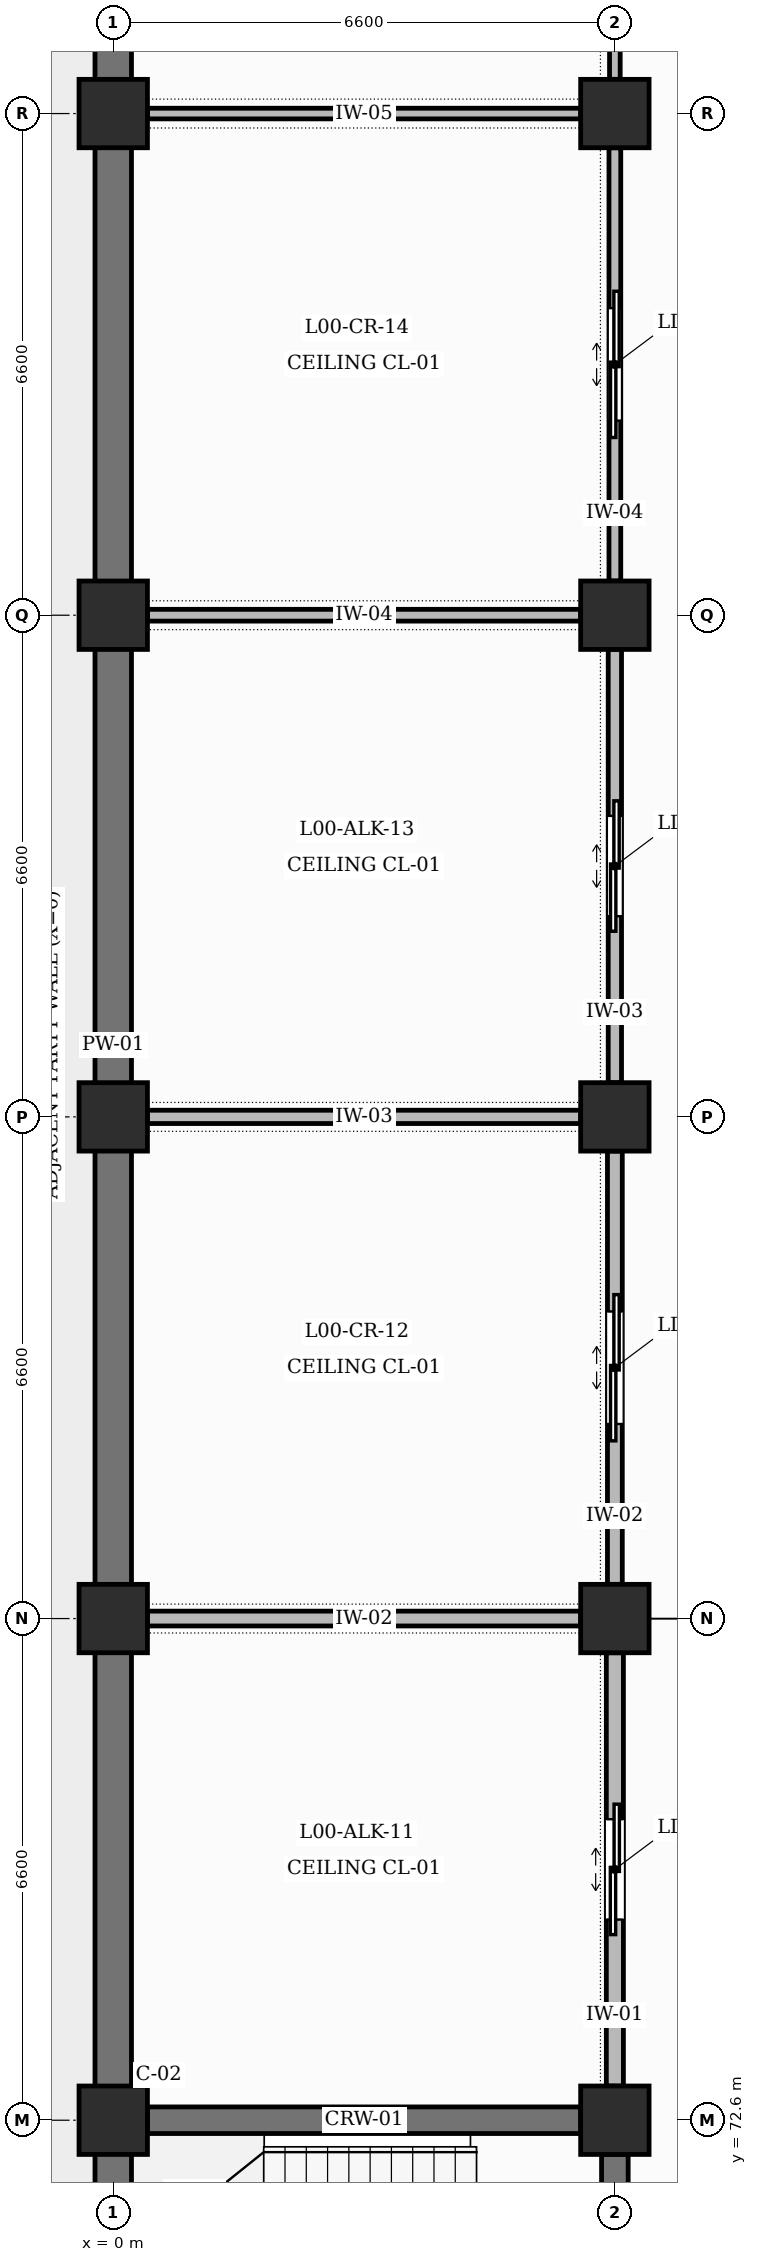
"""IFC4 building model, lengths in metres.
Left out: names, types, materials, properties, quantities, classifications, styles, units other than length and angle.
Written with IfcOpenShell. Run it as: python <this file> out.ifc"""

import sys

from ifc_helpers import new_model, si_unit, direction, frame, frame_2d, origin, origin_2d, place, context, subcontext, project, spatial, rectangle, extrude, element, fill, save


model = new_model("IFC4")
c1 = context("Model", 3, precision=1e-05, world=origin(), true_north=direction((0.0, 1.0)))
c2 = subcontext(c1, "Body", "Model", "MODEL_VIEW")
j1 = project(units=[si_unit("LENGTHUNIT", "METRE"), si_unit("PLANEANGLEUNIT", "RADIAN")], contexts=[c1])
p1 = place(None, origin())
s1 = spatial("IfcSite", under=j1, at=p1, CompositionType="ELEMENT")
p2 = place(p1, origin())
s2 = spatial("IfcBuilding", under=s1, at=p2, CompositionType="ELEMENT")
p3 = place(p2, origin())
s3 = spatial("IfcBuildingStorey", under=s2, at=p3, CompositionType="ELEMENT", Elevation=0.0)
for number, where, z_axis, x_axis in (
    (1, (0.0, 72.6, 0.0), (0.0, 0.0, 1.0), (1.0, 0.0, 0.0)),
    (2, (0.0, 79.2, 0.0), (0.0, 0.0, 1.0), (1.0, 0.0, 0.0)),
    (3, (0.0, 85.8, 0.0), (0.0, 0.0, 1.0), (1.0, 0.0, 0.0)),
    (4, (0.0, 92.4, 0.0), (0.0, 0.0, 1.0), (1.0, 0.0, 0.0)),
    (5, (0.0, 99.0, 0.0), (0.0, 0.0, 1.0), (1.0, 0.0, 0.0)),
    (6, (6.6, 72.6, 0.0), (0.0, 0.0, 1.0), (1.0, 0.0, 0.0)),
    (7, (6.6, 79.2, 0.0), (0.0, 0.0, 1.0), (1.0, 0.0, 0.0)),
    (8, (6.6, 85.8, 0.0), (0.0, 0.0, 1.0), (1.0, 0.0, 0.0)),
    (9, (6.6, 92.4, 0.0), (0.0, 0.0, 1.0), (1.0, 0.0, 0.0)),
    (10, (6.6, 99.0, 0.0), (0.0, 0.0, 1.0), (1.0, 0.0, 0.0)),
):
    element("IfcColumn", number, at=place(p3, frame(where, z_axis=z_axis, x_axis=x_axis)), inside=s3, PredefinedType="COLUMN", context=c2, shape_type="SweptSolid", body=[
        extrude(rectangle(XDim=0.9, YDim=0.9, at=origin_2d()), origin(), (0.0, 0.0, 1.0), 5.4),
    ])
for number, where, z_axis, x_axis in (
    (11, (0.0, 66.45, 0.0), (0.0, 0.0, 1.0), (0.0, 1.0, 0.0)),
    (12, (0.0, 73.05, 0.0), (0.0, 0.0, 1.0), (0.0, 1.0, 0.0)),
):
    element("IfcWall", number, at=place(p3, frame(where, z_axis=z_axis, x_axis=x_axis)), inside=s3, PredefinedType="SOLIDWALL", context=c2, shape_type="SweptSolid", body=[
        extrude(rectangle(XDim=5.7, YDim=0.48, at=frame_2d((2.85, 0.0))), origin(), (0.0, 0.0, 1.0), 4.45),
    ])
p4 = place(p3, frame((0.0, 79.65, 0.0), z_axis=(0.0, 0.0, 1.0), x_axis=(0.0, 1.0, 0.0)))
e13 = element("IfcWall", 13, at=p4, inside=s3, PredefinedType="SOLIDWALL", context=c2, shape_type="SweptSolid", body=[
    extrude(rectangle(XDim=5.7, YDim=0.48, at=frame_2d((2.85, 0.0))), origin(), (0.0, 0.0, 1.0), 4.45),
])
for number, where, z_axis, x_axis in (
    (14, (0.0, 86.25, 0.0), (0.0, 0.0, 1.0), (0.0, 1.0, 0.0)),
    (15, (0.0, 92.85, 0.0), (0.0, 0.0, 1.0), (0.0, 1.0, 0.0)),
    (16, (0.0, 99.45, 0.0), (0.0, 0.0, 1.0), (0.0, 1.0, 0.0)),
):
    element("IfcWall", number, at=place(p3, frame(where, z_axis=z_axis, x_axis=x_axis)), inside=s3, PredefinedType="SOLIDWALL", context=c2, shape_type="SweptSolid", body=[
        extrude(rectangle(XDim=5.7, YDim=0.48, at=frame_2d((2.85, 0.0))), origin(), (0.0, 0.0, 1.0), 4.45),
    ])
p5 = place(p3, frame((0.45, 72.6, 0.0), z_axis=(0.0, 0.0, 1.0), x_axis=(1.0, 0.0, 0.0)))
e17 = element("IfcWall", 17, at=p5, inside=s3, PredefinedType="SHEAR", context=c2, shape_type="SweptSolid", body=[
    extrude(rectangle(XDim=5.7, YDim=0.35, at=frame_2d((2.85, 0.0))), origin(), (0.0, 0.0, 1.0), 4.3),
])
p6 = place(p3, frame((6.6, 66.45, 0.0), z_axis=(0.0, 0.0, 1.0), x_axis=(0.0, 1.0, 0.0)))
e18 = element("IfcWall", 18, at=p6, inside=s3, PredefinedType="SHEAR", context=c2, shape_type="SweptSolid", body=[
    extrude(rectangle(XDim=5.7, YDim=0.35, at=frame_2d((2.85, 0.0))), origin(), (0.0, 0.0, 1.0), 4.3),
])
p7 = place(p6, frame((2.275, 0.0, 0.0)))
e19 = element("IfcOpeningElement", 19, at=p7, cuts=e18, PredefinedType="OPENING", context=c2, shape_type="SweptSolid", body=[
    extrude(rectangle(XDim=1.15, YDim=2.2, at=frame_2d((0.575, 1.1))), frame((0.0, 0.185, 0.0), z_axis=(0.0, -1.0, 0.0), x_axis=(1.0, 0.0, 0.0)), (0.0, 0.0, 1.0), 0.37),
])
p8 = place(p3, frame((6.6, 73.05, 0.0), z_axis=(0.0, 0.0, 1.0), x_axis=(0.0, 1.0, 0.0)))
e20 = element("IfcWall", 20, at=p8, inside=s3, PredefinedType="PARTITIONING", context=c2, shape_type="SweptSolid", body=[
    extrude(rectangle(XDim=5.7, YDim=0.225, at=frame_2d((2.85, 0.0))), origin(), (0.0, 0.0, 1.0), 4.3),
])
p9 = place(p8, frame((2.19, 0.0, 0.0)))
e21 = element("IfcOpeningElement", 21, at=p9, cuts=e20, PredefinedType="OPENING", context=c2, shape_type="SweptSolid", body=[
    extrude(rectangle(XDim=1.32, YDim=2.2, at=frame_2d((0.66, 1.1))), frame((0.0, 0.123, 0.0), z_axis=(0.0, -1.0, 0.0), x_axis=(1.0, 0.0, 0.0)), (0.0, 0.0, 1.0), 0.245),
])
p10 = place(p3, frame((0.45, 79.2, 0.0), z_axis=(0.0, 0.0, 1.0), x_axis=(1.0, 0.0, 0.0)))
e22 = element("IfcWall", 22, at=p10, inside=s3, PredefinedType="PARTITIONING", context=c2, shape_type="SweptSolid", body=[
    extrude(rectangle(XDim=5.7, YDim=0.195, at=frame_2d((2.85, 0.0))), origin(), (0.0, 0.0, 1.0), 4.2),
])
p11 = place(p3, frame((6.6, 79.65, 0.0), z_axis=(0.0, 0.0, 1.0), x_axis=(0.0, 1.0, 0.0)))
e23 = element("IfcWall", 23, at=p11, inside=s3, PredefinedType="PARTITIONING", context=c2, shape_type="SweptSolid", body=[
    extrude(rectangle(XDim=5.7, YDim=0.195, at=frame_2d((2.85, 0.0))), origin(), (0.0, 0.0, 1.0), 4.3),
])
p12 = place(p11, frame((2.11, 0.0, 0.0)))
e24 = element("IfcOpeningElement", 24, at=p12, cuts=e23, PredefinedType="OPENING", context=c2, shape_type="SweptSolid", body=[
    extrude(rectangle(XDim=1.48, YDim=2.25, at=frame_2d((0.74, 1.125))), frame((0.0, 0.107, 0.0), z_axis=(0.0, -1.0, 0.0), x_axis=(1.0, 0.0, 0.0)), (0.0, 0.0, 1.0), 0.215),
])
p13 = place(p3, frame((0.45, 85.8, 0.0), z_axis=(0.0, 0.0, 1.0), x_axis=(1.0, 0.0, 0.0)))
e25 = element("IfcWall", 25, at=p13, inside=s3, PredefinedType="PARTITIONING", context=c2, shape_type="SweptSolid", body=[
    extrude(rectangle(XDim=5.7, YDim=0.175, at=frame_2d((2.85, 0.0))), origin(), (0.0, 0.0, 1.0), 4.3),
])
p14 = place(p3, frame((6.6, 86.25, 0.0), z_axis=(0.0, 0.0, 1.0), x_axis=(0.0, 1.0, 0.0)))
e26 = element("IfcWall", 26, at=p14, inside=s3, PredefinedType="PARTITIONING", context=c2, shape_type="SweptSolid", body=[
    extrude(rectangle(XDim=5.7, YDim=0.175, at=frame_2d((2.85, 0.0))), origin(), (0.0, 0.0, 1.0), 4.3),
])
p15 = place(p14, frame((2.19, 0.0, 0.0)))
e27 = element("IfcOpeningElement", 27, at=p15, cuts=e26, PredefinedType="OPENING", context=c2, shape_type="SweptSolid", body=[
    extrude(rectangle(XDim=1.32, YDim=2.2, at=frame_2d((0.66, 1.1))), frame((0.0, 0.097, 0.0), z_axis=(0.0, -1.0, 0.0), x_axis=(1.0, 0.0, 0.0)), (0.0, 0.0, 1.0), 0.195),
])
p16 = place(p3, frame((0.45, 92.4, 0.0), z_axis=(0.0, 0.0, 1.0), x_axis=(1.0, 0.0, 0.0)))
e28 = element("IfcWall", 28, at=p16, inside=s3, PredefinedType="PARTITIONING", context=c2, shape_type="SweptSolid", body=[
    extrude(rectangle(XDim=5.7, YDim=0.155, at=frame_2d((2.85, 0.0))), origin(), (0.0, 0.0, 1.0), 4.2),
])
p17 = place(p3, frame((6.6, 92.85, 0.0), z_axis=(0.0, 0.0, 1.0), x_axis=(0.0, 1.0, 0.0)))
e29 = element("IfcWall", 29, at=p17, inside=s3, PredefinedType="PARTITIONING", context=c2, shape_type="SweptSolid", body=[
    extrude(rectangle(XDim=5.7, YDim=0.155, at=frame_2d((2.85, 0.0))), origin(), (0.0, 0.0, 1.0), 4.3),
])
p18 = place(p17, frame((2.11, 0.0, 0.0)))
e30 = element("IfcOpeningElement", 30, at=p18, cuts=e29, PredefinedType="OPENING", context=c2, shape_type="SweptSolid", body=[
    extrude(rectangle(XDim=1.48, YDim=2.25, at=frame_2d((0.74, 1.125))), frame((0.0, 0.087, 0.0), z_axis=(0.0, -1.0, 0.0), x_axis=(1.0, 0.0, 0.0)), (0.0, 0.0, 1.0), 0.175),
])
p19 = place(p3, frame((0.45, 99.0, 0.0), z_axis=(0.0, 0.0, 1.0), x_axis=(1.0, 0.0, 0.0)))
e31 = element("IfcWall", 31, at=p19, inside=s3, PredefinedType="PARTITIONING", context=c2, shape_type="SweptSolid", body=[
    extrude(rectangle(XDim=5.7, YDim=0.14, at=frame_2d((2.85, 0.0))), origin(), (0.0, 0.0, 1.0), 4.3),
])
p20 = place(p3, frame((6.6, 99.45, 0.0), z_axis=(0.0, 0.0, 1.0), x_axis=(0.0, 1.0, 0.0)))
e32 = element("IfcWall", 32, at=p20, inside=s3, PredefinedType="PARTITIONING", context=c2, shape_type="SweptSolid", body=[
    extrude(rectangle(XDim=5.7, YDim=0.14, at=frame_2d((2.85, 0.0))), origin(), (0.0, 0.0, 1.0), 4.3),
])
p21 = place(p20, frame((2.19, 0.0, 0.0)))
e33 = element("IfcOpeningElement", 33, at=p21, cuts=e32, PredefinedType="OPENING", context=c2, shape_type="SweptSolid", body=[
    extrude(rectangle(XDim=1.32, YDim=2.2, at=frame_2d((0.66, 1.1))), frame((0.0, 0.08, 0.0), z_axis=(0.0, -1.0, 0.0), x_axis=(1.0, 0.0, 0.0)), (0.0, 0.0, 1.0), 0.16),
])
p22 = place(p9, origin())
e34 = element("IfcDoor", 34, at=p22, inside=s3, OperationType="DOUBLE_DOOR_SLIDING", PredefinedType="USERDEFINED", context=c2, shape_type="SweptSolid", body=[
    extrude(rectangle(XDim=1.32, YDim=2.2, at=frame_2d((0.66, 1.1))), frame((0.0, 0.025, 0.0), z_axis=(0.0, -1.0, 0.0), x_axis=(1.0, 0.0, 0.0)), (0.0, 0.0, 1.0), 0.05),
])
fill(e21, e34)
p23 = place(p12, origin())
e35 = element("IfcDoor", 35, at=p23, inside=s3, OperationType="DOUBLE_DOOR_SLIDING", PredefinedType="USERDEFINED", context=c2, shape_type="SweptSolid", body=[
    extrude(rectangle(XDim=1.48, YDim=2.25, at=frame_2d((0.74, 1.125))), frame((0.0, 0.025, 0.0), z_axis=(0.0, -1.0, 0.0), x_axis=(1.0, 0.0, 0.0)), (0.0, 0.0, 1.0), 0.05),
])
fill(e24, e35)
p24 = place(p15, origin())
e36 = element("IfcDoor", 36, at=p24, inside=s3, OperationType="DOUBLE_DOOR_SLIDING", PredefinedType="USERDEFINED", context=c2, shape_type="SweptSolid", body=[
    extrude(rectangle(XDim=1.32, YDim=2.2, at=frame_2d((0.66, 1.1))), frame((0.0, 0.025, 0.0), z_axis=(0.0, -1.0, 0.0), x_axis=(1.0, 0.0, 0.0)), (0.0, 0.0, 1.0), 0.05),
])
fill(e27, e36)
p25 = place(p18, origin())
e37 = element("IfcDoor", 37, at=p25, inside=s3, OperationType="DOUBLE_DOOR_SLIDING", PredefinedType="USERDEFINED", context=c2, shape_type="SweptSolid", body=[
    extrude(rectangle(XDim=1.48, YDim=2.25, at=frame_2d((0.74, 1.125))), frame((0.0, 0.025, 0.0), z_axis=(0.0, -1.0, 0.0), x_axis=(1.0, 0.0, 0.0)), (0.0, 0.0, 1.0), 0.05),
])
fill(e30, e37)
save(model, sys.argv[1])
